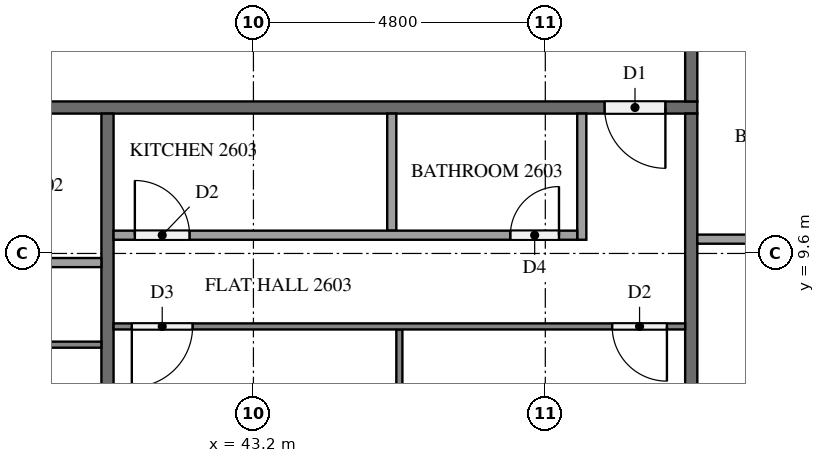
"""IFC4 building model, lengths in metres.
Left out: names, types, materials, properties, quantities, classifications, styles, units other than length and angle.
Written with IfcOpenShell. Run it as: python <this file> out.ifc"""

import sys

from ifc_helpers import new_model, si_unit, direction, frame, frame_2d, origin, place, context, subcontext, project, spatial, rectangle, extrude, element, fill, save


model = new_model("IFC4")
c1 = context("Model", 3, precision=1e-05, world=origin(), true_north=direction((0.0, 1.0)))
c2 = subcontext(c1, "Body", "Model", "MODEL_VIEW")
j1 = project(units=[si_unit("LENGTHUNIT", "METRE"), si_unit("PLANEANGLEUNIT", "RADIAN")], contexts=[c1])
p1 = place(None, origin())
s1 = spatial("IfcSite", under=j1, at=p1, CompositionType="ELEMENT")
p2 = place(p1, origin())
s2 = spatial("IfcBuilding", under=s1, at=p2, CompositionType="ELEMENT")
p3 = place(p2, frame((0.0, 0.0, 103.2)))
s3 = spatial("IfcBuildingStorey", under=s2, at=p3, CompositionType="ELEMENT", Elevation=103.2)
p4 = place(p3, frame((50.5, 12.0, 0.0), z_axis=(0.0, 0.0, 1.0), x_axis=(-1.0, 0.0, 0.0)))
e1 = element("IfcWall", 1, at=p4, inside=s3, PredefinedType="PARTITIONING", context=c2, shape_type="SweptSolid", body=[
    extrude(rectangle(XDim=38.6, YDim=0.2, at=frame_2d((19.3, 0.0))), origin(), (0.0, 0.0, 1.0), 3.2),
])
p5 = place(p4, frame((37.075, 0.0, 0.0)))
e2 = element("IfcOpeningElement", 2, at=p5, cuts=e1, PredefinedType="OPENING", context=c2, shape_type="SweptSolid", body=[
    extrude(rectangle(XDim=1.0, YDim=2.1, at=frame_2d((0.5, 1.05))), frame((0.0, 0.11, 0.0), z_axis=(0.0, -1.0, 0.0), x_axis=(1.0, 0.0, 0.0)), (0.0, 0.0, 1.0), 0.22),
])
p6 = place(p4, frame((22.675, 0.0, 0.0)))
e3 = element("IfcOpeningElement", 3, at=p6, cuts=e1, PredefinedType="OPENING", context=c2, shape_type="SweptSolid", body=[
    extrude(rectangle(XDim=1.0, YDim=2.1, at=frame_2d((0.5, 1.05))), frame((0.0, 0.11, 0.0), z_axis=(0.0, -1.0, 0.0), x_axis=(1.0, 0.0, 0.0)), (0.0, 0.0, 1.0), 0.22),
])
p7 = place(p4, frame((0.525, 0.0, 0.0)))
e4 = element("IfcOpeningElement", 4, at=p7, cuts=e1, PredefinedType="OPENING", context=c2, shape_type="SweptSolid", body=[
    extrude(rectangle(XDim=1.0, YDim=2.1, at=frame_2d((0.5, 1.05))), frame((0.0, 0.11, 0.0), z_axis=(0.0, -1.0, 0.0), x_axis=(1.0, 0.0, 0.0)), (0.0, 0.0, 1.0), 0.22),
])
p8 = place(p3, frame((50.4, 14.9, 0.0), z_axis=(0.0, 0.0, 1.0), x_axis=(0.0, -1.0, 0.0)))
e5 = element("IfcWall", 5, at=p8, inside=s3, PredefinedType="PARTITIONING", context=c2, shape_type="SweptSolid", body=[
    extrude(rectangle(XDim=2.8, YDim=0.2, at=frame_2d((1.4, 0.0))), origin(), (0.0, 0.0, 1.0), 3.2),
])
p9 = place(p8, frame((0.325, 0.0, 0.0)))
e6 = element("IfcOpeningElement", 6, at=p9, cuts=e5, PredefinedType="OPENING", context=c2, shape_type="SweptSolid", body=[
    extrude(rectangle(XDim=1.0, YDim=2.1, at=frame_2d((0.5, 1.05))), frame((0.0, 0.11, 0.0), z_axis=(0.0, -1.0, 0.0), x_axis=(1.0, 0.0, 0.0)), (0.0, 0.0, 1.0), 0.22),
])
for number, where, z_axis, x_axis in (
    (7, (40.8, 11.9, 0.0), (0.0, 0.0, 1.0), (0.0, -1.0, 0.0)),
    (8, (50.4, 11.9, 0.0), (0.0, 0.0, 1.0), (0.0, -1.0, 0.0)),
):
    element("IfcWall", number, at=place(p3, frame(where, z_axis=z_axis, x_axis=x_axis)), inside=s3, PredefinedType="PARTITIONING", context=c2, shape_type="SweptSolid", body=[
        extrude(rectangle(XDim=7.0, YDim=0.2, at=frame_2d((3.5, 0.0))), origin(), (0.0, 0.0, 1.0), 3.2),
    ])
p10 = place(p3, frame((40.7, 8.1, 0.0), z_axis=(0.0, 0.0, 1.0), x_axis=(-1.0, 0.0, 0.0)))
e9 = element("IfcWall", 9, at=p10, inside=s3, PredefinedType="PARTITIONING", context=c2, shape_type="SweptSolid", body=[
    extrude(rectangle(XDim=14.2, YDim=0.1, at=frame_2d((7.1, 0.0))), origin(), (0.0, 0.0, 1.0), 3.2),
])
p11 = place(p10, frame((13.0, 0.0, 0.0)))
e10 = element("IfcOpeningElement", 10, at=p11, cuts=e9, PredefinedType="OPENING", context=c2, shape_type="SweptSolid", body=[
    extrude(rectangle(XDim=0.9, YDim=2.1, at=frame_2d((0.45, 1.05))), frame((0.0, 0.06, 0.0), z_axis=(0.0, -1.0, 0.0), x_axis=(1.0, 0.0, 0.0)), (0.0, 0.0, 1.0), 0.12),
])
p12 = place(p10, frame((5.05, 0.0, 0.0)))
e11 = element("IfcOpeningElement", 11, at=p12, cuts=e9, PredefinedType="OPENING", context=c2, shape_type="SweptSolid", body=[
    extrude(rectangle(XDim=1.0, YDim=2.1, at=frame_2d((0.5, 1.05))), frame((0.0, 0.06, 0.0), z_axis=(0.0, -1.0, 0.0), x_axis=(1.0, 0.0, 0.0)), (0.0, 0.0, 1.0), 0.12),
])
p13 = place(p10, frame((3.45, 0.0, 0.0)))
e12 = element("IfcOpeningElement", 12, at=p13, cuts=e9, PredefinedType="OPENING", context=c2, shape_type="SweptSolid", body=[
    extrude(rectangle(XDim=0.9, YDim=2.1, at=frame_2d((0.45, 1.05))), frame((0.0, 0.06, 0.0), z_axis=(0.0, -1.0, 0.0), x_axis=(1.0, 0.0, 0.0)), (0.0, 0.0, 1.0), 0.12),
])
p14 = place(p3, frame((28.275, 9.45, 0.0), z_axis=(0.0, 0.0, 1.0), x_axis=(1.0, 0.0, 0.0)))
e13 = element("IfcWall", 13, at=p14, inside=s3, PredefinedType="PARTITIONING", context=c2, shape_type="SweptSolid", body=[
    extrude(rectangle(XDim=12.425, YDim=0.15, at=frame_2d((6.212, 0.0))), origin(), (0.0, 0.0, 1.0), 3.2),
])
p15 = place(p14, frame((0.3, 0.0, 0.0)))
e14 = element("IfcOpeningElement", 14, at=p15, cuts=e13, PredefinedType="OPENING", context=c2, shape_type="SweptSolid", body=[
    extrude(rectangle(XDim=0.8, YDim=2.1, at=frame_2d((0.4, 1.05))), frame((0.0, 0.085, 0.0), z_axis=(0.0, -1.0, 0.0), x_axis=(1.0, 0.0, 0.0)), (0.0, 0.0, 1.0), 0.17),
])
p16 = place(p14, frame((7.377, 0.0, 0.0)))
e15 = element("IfcOpeningElement", 15, at=p16, cuts=e13, PredefinedType="OPENING", context=c2, shape_type="SweptSolid", body=[
    extrude(rectangle(XDim=0.9, YDim=2.1, at=frame_2d((0.45, 1.05))), frame((0.0, 0.085, 0.0), z_axis=(0.0, -1.0, 0.0), x_axis=(1.0, 0.0, 0.0)), (0.0, 0.0, 1.0), 0.17),
])
p17 = place(p14, frame((8.927, 0.0, 0.0)))
e16 = element("IfcOpeningElement", 16, at=p17, cuts=e13, PredefinedType="OPENING", context=c2, shape_type="SweptSolid", body=[
    extrude(rectangle(XDim=0.9, YDim=2.1, at=frame_2d((0.45, 1.05))), frame((0.0, 0.085, 0.0), z_axis=(0.0, -1.0, 0.0), x_axis=(1.0, 0.0, 0.0)), (0.0, 0.0, 1.0), 0.17),
])
p18 = place(p3, frame((45.6, 8.35, 0.0), z_axis=(0.0, 0.0, 1.0), x_axis=(0.0, -1.0, 0.0)))
e17 = element("IfcWall", 17, at=p18, inside=s3, PredefinedType="PARTITIONING", context=c2, shape_type="SweptSolid", body=[
    extrude(rectangle(XDim=3.45, YDim=0.1, at=frame_2d((1.725, 0.0))), origin(), (0.0, 0.0, 1.0), 3.2),
])
p19 = place(p3, frame((50.3, 8.4, 0.0), z_axis=(0.0, 0.0, 1.0), x_axis=(-1.0, 0.0, 0.0)))
e18 = element("IfcWall", 18, at=p19, inside=s3, PredefinedType="PARTITIONING", context=c2, shape_type="SweptSolid", body=[
    extrude(rectangle(XDim=9.4, YDim=0.1, at=frame_2d((4.7, 0.0))), origin(), (0.0, 0.0, 1.0), 3.2),
])
p20 = place(p19, frame((0.3, 0.0, 0.0)))
e19 = element("IfcOpeningElement", 19, at=p20, cuts=e18, PredefinedType="OPENING", context=c2, shape_type="SweptSolid", body=[
    extrude(rectangle(XDim=0.9, YDim=2.1, at=frame_2d((0.45, 1.05))), frame((0.0, 0.06, 0.0), z_axis=(0.0, -1.0, 0.0), x_axis=(1.0, 0.0, 0.0)), (0.0, 0.0, 1.0), 0.12),
])
p21 = place(p19, frame((8.1, 0.0, 0.0)))
e20 = element("IfcOpeningElement", 20, at=p21, cuts=e18, PredefinedType="OPENING", context=c2, shape_type="SweptSolid", body=[
    extrude(rectangle(XDim=1.0, YDim=2.1, at=frame_2d((0.5, 1.05))), frame((0.0, 0.06, 0.0), z_axis=(0.0, -1.0, 0.0), x_axis=(1.0, 0.0, 0.0)), (0.0, 0.0, 1.0), 0.12),
])
p22 = place(p3, frame((45.475, 11.9, 0.0), z_axis=(0.0, 0.0, 1.0), x_axis=(0.0, -1.0, 0.0)))
e21 = element("IfcWall", 21, at=p22, inside=s3, PredefinedType="PARTITIONING", context=c2, shape_type="SweptSolid", body=[
    extrude(rectangle(XDim=1.925, YDim=0.15, at=frame_2d((0.962, 0.0))), origin(), (0.0, 0.0, 1.0), 3.2),
])
p23 = place(p3, frame((48.6, 11.9, 0.0), z_axis=(0.0, 0.0, 1.0), x_axis=(0.0, -1.0, 0.0)))
e22 = element("IfcWall", 22, at=p23, inside=s3, PredefinedType="PARTITIONING", context=c2, shape_type="SweptSolid", body=[
    extrude(rectangle(XDim=2.075, YDim=0.15, at=frame_2d((1.038, 0.0))), origin(), (0.0, 0.0, 1.0), 3.2),
])
p24 = place(p3, frame((40.9, 9.9, 0.0), z_axis=(0.0, 0.0, 1.0), x_axis=(1.0, 0.0, 0.0)))
e23 = element("IfcWall", 23, at=p24, inside=s3, PredefinedType="PARTITIONING", context=c2, shape_type="SweptSolid", body=[
    extrude(rectangle(XDim=7.625, YDim=0.15, at=frame_2d((3.812, 0.0))), origin(), (0.0, 0.0, 1.0), 3.2),
])
p25 = place(p24, frame((6.525, 0.0, 0.0)))
e24 = element("IfcOpeningElement", 24, at=p25, cuts=e23, PredefinedType="OPENING", context=c2, shape_type="SweptSolid", body=[
    extrude(rectangle(XDim=0.8, YDim=2.1, at=frame_2d((0.4, 1.05))), frame((0.0, 0.085, 0.0), z_axis=(0.0, -1.0, 0.0), x_axis=(1.0, 0.0, 0.0)), (0.0, 0.0, 1.0), 0.17),
])
p26 = place(p24, frame((0.35, 0.0, 0.0)))
e25 = element("IfcOpeningElement", 25, at=p26, cuts=e23, PredefinedType="OPENING", context=c2, shape_type="SweptSolid", body=[
    extrude(rectangle(XDim=0.9, YDim=2.1, at=frame_2d((0.45, 1.05))), frame((0.0, 0.085, 0.0), z_axis=(0.0, -1.0, 0.0), x_axis=(1.0, 0.0, 0.0)), (0.0, 0.0, 1.0), 0.17),
])
p27 = place(p3, frame((50.5, 9.835, 0.0), z_axis=(0.0, 0.0, 1.0), x_axis=(1.0, 0.0, 0.0)))
e26 = element("IfcWall", 26, at=p27, inside=s3, PredefinedType="PARTITIONING", context=c2, shape_type="SweptSolid", body=[
    extrude(rectangle(XDim=3.725, YDim=0.15, at=frame_2d((1.863, 0.0))), origin(), (0.0, 0.0, 1.0), 3.2),
])
p28 = place(p7, origin())
e27 = element("IfcDoor", 27, at=p28, inside=s3, OperationType="SINGLE_SWING_LEFT", PredefinedType="DOOR", context=c2, shape_type="SweptSolid", body=[
    extrude(rectangle(XDim=1.0, YDim=2.1, at=frame_2d((0.5, 1.05))), frame((0.0, 0.025, 0.0), z_axis=(0.0, -1.0, 0.0), x_axis=(1.0, 0.0, 0.0)), (0.0, 0.0, 1.0), 0.05),
])
fill(e4, e27)
p29 = place(p20, origin())
e28 = element("IfcDoor", 28, at=p29, inside=s3, OperationType="SINGLE_SWING_LEFT", PredefinedType="DOOR", context=c2, shape_type="SweptSolid", body=[
    extrude(rectangle(XDim=0.9, YDim=2.1, at=frame_2d((0.45, 1.05))), frame((0.0, 0.025, 0.0), z_axis=(0.0, -1.0, 0.0), x_axis=(1.0, 0.0, 0.0)), (0.0, 0.0, 1.0), 0.05),
])
fill(e19, e28)
p30 = place(p21, origin())
e29 = element("IfcDoor", 29, at=p30, inside=s3, OperationType="SINGLE_SWING_RIGHT", PredefinedType="DOOR", context=c2, shape_type="SweptSolid", body=[
    extrude(rectangle(XDim=1.0, YDim=2.1, at=frame_2d((0.5, 1.05))), frame((0.0, 0.025, 0.0), z_axis=(0.0, -1.0, 0.0), x_axis=(1.0, 0.0, 0.0)), (0.0, 0.0, 1.0), 0.05),
])
fill(e20, e29)
p31 = place(p25, origin())
e30 = element("IfcDoor", 30, at=p31, inside=s3, OperationType="SINGLE_SWING_RIGHT", PredefinedType="DOOR", context=c2, shape_type="SweptSolid", body=[
    extrude(rectangle(XDim=0.8, YDim=2.1, at=frame_2d((0.4, 1.05))), frame((0.0, 0.025, 0.0), z_axis=(0.0, -1.0, 0.0), x_axis=(1.0, 0.0, 0.0)), (0.0, 0.0, 1.0), 0.05),
])
fill(e24, e30)
p32 = place(p26, origin())
e31 = element("IfcDoor", 31, at=p32, inside=s3, OperationType="SINGLE_SWING_LEFT", PredefinedType="DOOR", context=c2, shape_type="SweptSolid", body=[
    extrude(rectangle(XDim=0.9, YDim=2.1, at=frame_2d((0.45, 1.05))), frame((0.0, 0.025, 0.0), z_axis=(0.0, -1.0, 0.0), x_axis=(1.0, 0.0, 0.0)), (0.0, 0.0, 1.0), 0.05),
])
fill(e25, e31)
save(model, sys.argv[1])
